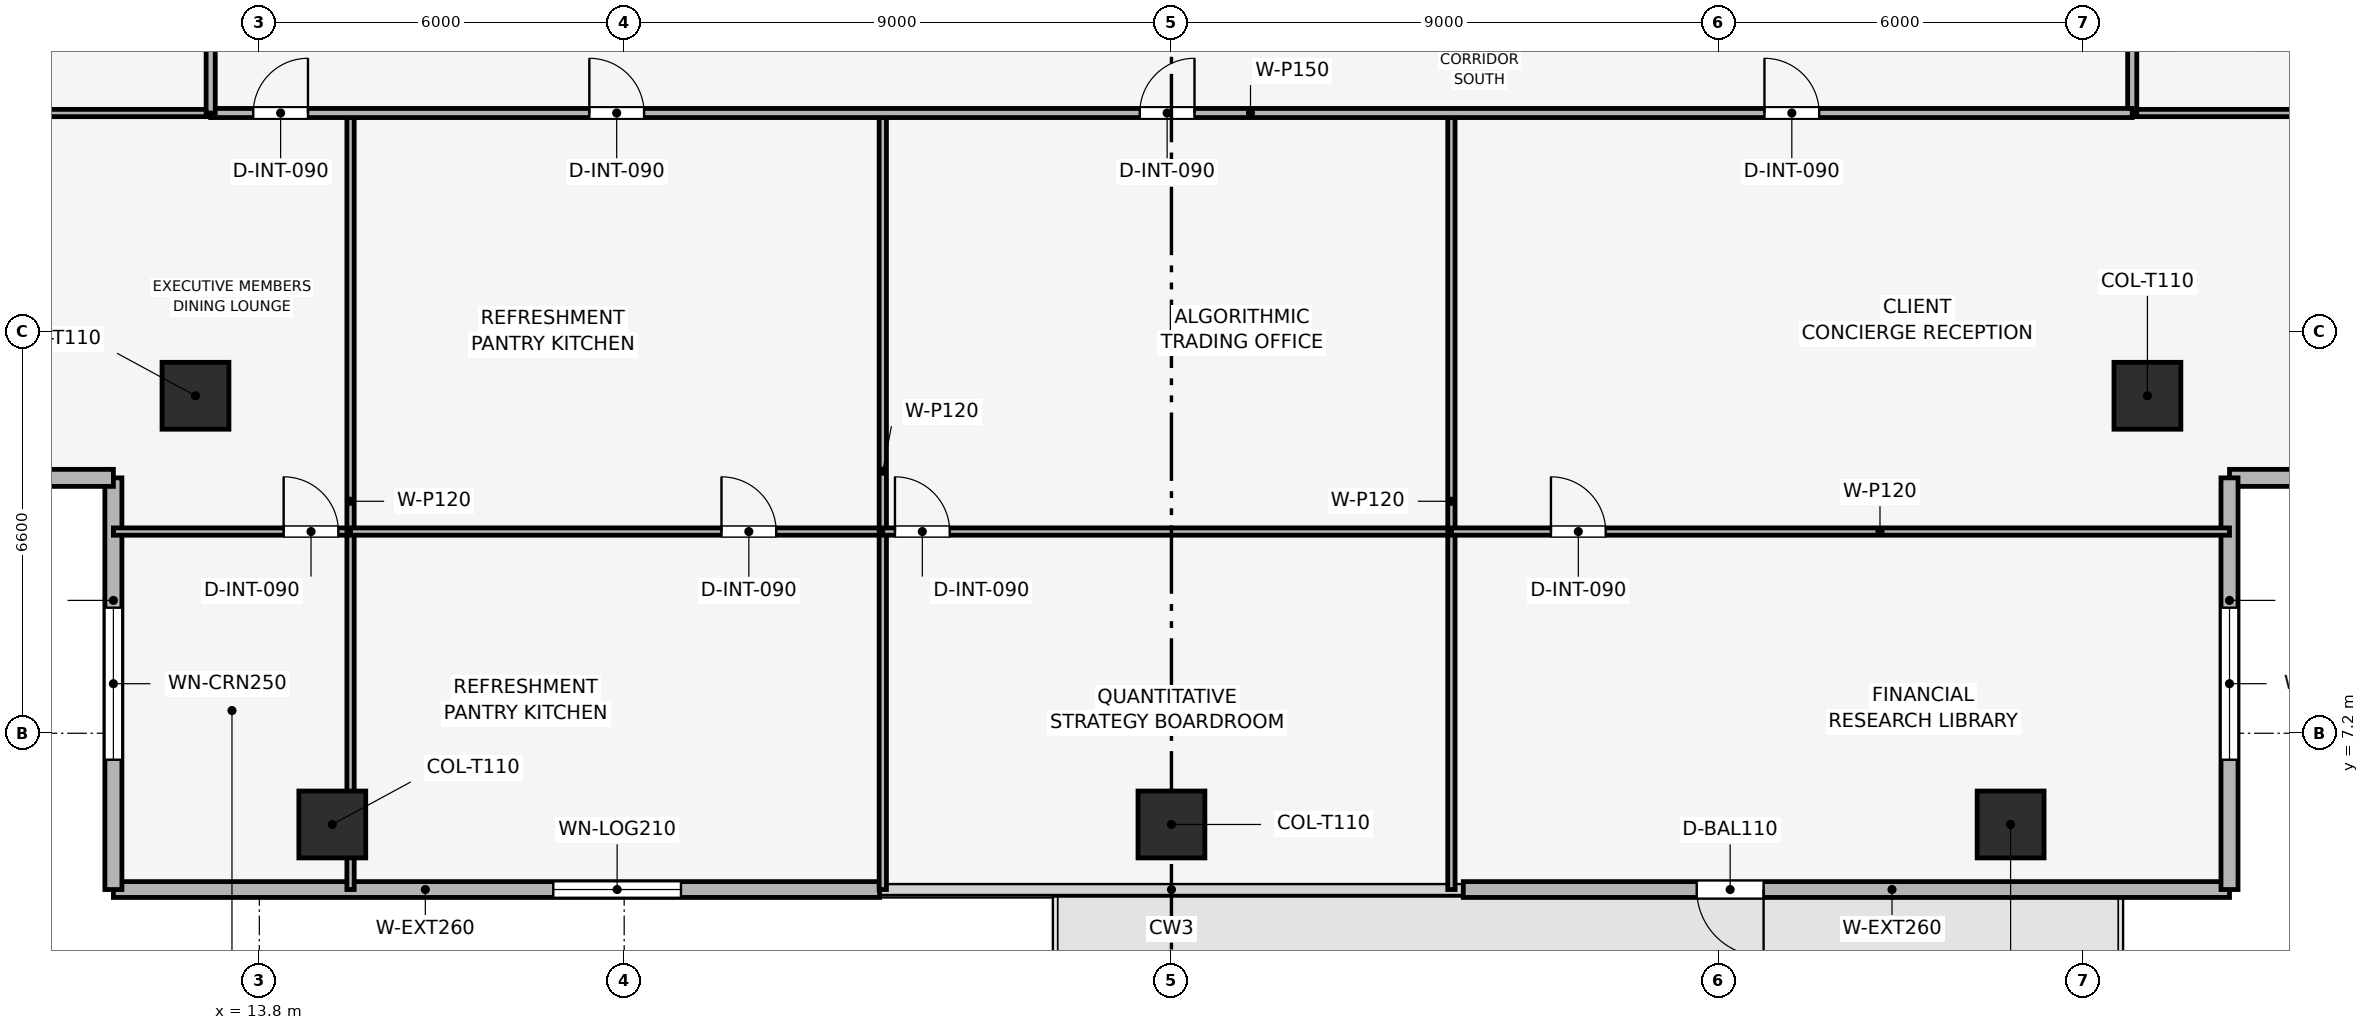
"""IFC4 building model, lengths in metres.
Left out: names, types, materials, properties, quantities, classifications, styles, units other than length and angle.
Written with IfcOpenShell. Run it as: python <this file> out.ifc"""

import sys

from ifc_helpers import new_model, si_unit, direction, frame, frame_2d, origin, origin_2d, place, context, subcontext, project, spatial, rectangle, extrude, element, fill, save


model = new_model("IFC4")
c1 = context("Model", 3, precision=1e-05, world=origin(), true_north=direction((0.0, 1.0)))
c2 = subcontext(c1, "Body", "Model", "MODEL_VIEW")
j1 = project(units=[si_unit("LENGTHUNIT", "METRE"), si_unit("PLANEANGLEUNIT", "RADIAN")], contexts=[c1])
p1 = place(None, origin())
s1 = spatial("IfcSite", under=j1, at=p1, CompositionType="ELEMENT")
p2 = place(p1, origin())
s2 = spatial("IfcBuilding", under=s1, at=p2, CompositionType="ELEMENT")
p3 = place(p2, frame((0.0, 0.0, 187.05)))
s3 = spatial("IfcBuildingStorey", under=s2, at=p3, CompositionType="ELEMENT", Elevation=187.05)
for number, where, z_axis, x_axis in (
    (1, (15.0, 5.7, 0.003), (0.0, 0.0, 1.0), (1.0, 0.0, 0.0)),
    (2, (28.8, 5.7, 0.003), (0.0, 0.0, 1.0), (1.0, 0.0, 0.0)),
    (3, (42.6, 5.7, 0.003), (0.0, 0.0, 1.0), (1.0, 0.0, 0.0)),
    (4, (12.75, 12.75, 0.003), (0.0, 0.0, 1.0), (1.0, 0.0, 0.0)),
    (5, (44.85, 12.75, 0.003), (0.0, 0.0, 1.0), (1.0, 0.0, 0.0)),
):
    element("IfcColumn", number, at=place(p3, frame(where, z_axis=z_axis, x_axis=x_axis)), inside=s3, PredefinedType="COLUMN", context=c2, shape_type="SweptSolid", body=[
        extrude(rectangle(XDim=1.1, YDim=1.1, at=origin_2d()), origin(), (0.0, 0.0, 1.0), 3.489),
    ])
p4 = place(p3, frame((46.2, 4.63, 0.0), z_axis=(0.0, 0.0, 1.0), x_axis=(-1.0, 0.0, 0.0)))
e6 = element("IfcWall", 6, at=p4, inside=s3, PredefinedType="SOLIDWALL", context=c2, shape_type="SweptSolid", body=[
    extrude(rectangle(XDim=12.6, YDim=0.26, at=frame_2d((6.3, 0.0))), origin(), (0.0, 0.0, 1.0), 3.495),
])
p5 = place(p4, frame((7.662, 0.0, 0.0)))
e7 = element("IfcOpeningElement", 7, at=p5, cuts=e6, PredefinedType="OPENING", context=c2, shape_type="SweptSolid", body=[
    extrude(rectangle(XDim=1.1, YDim=2.2, at=frame_2d((0.55, 1.1))), frame((0.0, 0.14, 0.0), z_axis=(0.0, -1.0, 0.0), x_axis=(1.0, 0.0, 0.0)), (0.0, 0.0, 1.0), 0.28),
])
p6 = place(p3, frame((24.0, 4.63, 0.0), z_axis=(0.0, 0.0, 1.0), x_axis=(-1.0, 0.0, 0.0)))
e8 = element("IfcWall", 8, at=p6, inside=s3, PredefinedType="SOLIDWALL", context=c2, shape_type="SweptSolid", body=[
    extrude(rectangle(XDim=12.6, YDim=0.26, at=frame_2d((6.3, 0.0))), origin(), (0.0, 0.0, 1.0), 3.495),
])
p7 = place(p6, frame((3.266, 0.0, 0.9)))
e9 = element("IfcOpeningElement", 9, at=p7, cuts=e8, PredefinedType="OPENING", context=c2, shape_type="SweptSolid", body=[
    extrude(rectangle(XDim=2.1, YDim=2.1, at=frame_2d((1.05, 1.05))), frame((0.0, 0.14, 0.0), z_axis=(0.0, -1.0, 0.0), x_axis=(1.0, 0.0, 0.0)), (0.0, 0.0, 1.0), 0.28),
])
p8 = place(p3, frame((11.4, 4.63, 0.0), z_axis=(0.0, 0.0, 1.0), x_axis=(0.0, 1.0, 0.0)))
e10 = element("IfcWall", 10, at=p8, inside=s3, PredefinedType="SOLIDWALL", context=c2, shape_type="SweptSolid", body=[
    extrude(rectangle(XDim=6.77, YDim=0.28, at=frame_2d((3.385, 0.0))), origin(), (0.0, 0.0, 1.0), 3.495),
])
p9 = place(p8, frame((2.135, 0.0, 0.9)))
e11 = element("IfcOpeningElement", 11, at=p9, cuts=e10, PredefinedType="OPENING", context=c2, shape_type="SweptSolid", body=[
    extrude(rectangle(XDim=2.5, YDim=1.9, at=frame_2d((1.25, 0.95))), frame((0.0, 0.15, 0.0), z_axis=(0.0, -1.0, 0.0), x_axis=(1.0, 0.0, 0.0)), (0.0, 0.0, 1.0), 0.3),
])
p10 = place(p3, frame((11.4, 11.4, 0.0), z_axis=(0.0, 0.0, 1.0), x_axis=(-1.0, 0.0, 0.0)))
e12 = element("IfcWall", 12, at=p10, inside=s3, PredefinedType="SOLIDWALL", context=c2, shape_type="SweptSolid", body=[
    extrude(rectangle(XDim=6.77, YDim=0.28, at=frame_2d((3.385, 0.0))), origin(), (0.0, 0.0, 1.0), 3.495),
])
p11 = place(p10, frame((2.135, 0.0, 0.9)))
e13 = element("IfcOpeningElement", 13, at=p11, cuts=e12, PredefinedType="OPENING", context=c2, shape_type="SweptSolid", body=[
    extrude(rectangle(XDim=2.5, YDim=1.9, at=frame_2d((1.25, 0.95))), frame((0.0, 0.15, 0.0), z_axis=(0.0, -1.0, 0.0), x_axis=(1.0, 0.0, 0.0)), (0.0, 0.0, 1.0), 0.3),
])
p12 = place(p3, frame((52.97, 11.4, 0.0), z_axis=(0.0, 0.0, 1.0), x_axis=(-1.0, 0.0, 0.0)))
e14 = element("IfcWall", 14, at=p12, inside=s3, PredefinedType="SOLIDWALL", context=c2, shape_type="SweptSolid", body=[
    extrude(rectangle(XDim=6.77, YDim=0.28, at=frame_2d((3.385, 0.0))), origin(), (0.0, 0.0, 1.0), 3.495),
])
p13 = place(p12, frame((2.135, 0.0, 0.9)))
e15 = element("IfcOpeningElement", 15, at=p13, cuts=e14, PredefinedType="OPENING", context=c2, shape_type="SweptSolid", body=[
    extrude(rectangle(XDim=2.5, YDim=1.9, at=frame_2d((1.25, 0.95))), frame((0.0, 0.15, 0.0), z_axis=(0.0, -1.0, 0.0), x_axis=(1.0, 0.0, 0.0)), (0.0, 0.0, 1.0), 0.3),
])
p14 = place(p3, frame((46.2, 11.4, 0.0), z_axis=(0.0, 0.0, 1.0), x_axis=(0.0, -1.0, 0.0)))
e16 = element("IfcWall", 16, at=p14, inside=s3, PredefinedType="SOLIDWALL", context=c2, shape_type="SweptSolid", body=[
    extrude(rectangle(XDim=6.77, YDim=0.28, at=frame_2d((3.385, 0.0))), origin(), (0.0, 0.0, 1.0), 3.495),
])
p15 = place(p14, frame((2.135, 0.0, 0.9)))
e17 = element("IfcOpeningElement", 17, at=p15, cuts=e16, PredefinedType="OPENING", context=c2, shape_type="SweptSolid", body=[
    extrude(rectangle(XDim=2.5, YDim=1.9, at=frame_2d((1.25, 0.95))), frame((0.0, 0.15, 0.0), z_axis=(0.0, -1.0, 0.0), x_axis=(1.0, 0.0, 0.0)), (0.0, 0.0, 1.0), 0.3),
])
p16 = place(p3, frame((11.4, 10.517, 0.0), z_axis=(0.0, 0.0, 1.0), x_axis=(1.0, 0.0, 0.0)))
e18 = element("IfcWall", 18, at=p16, inside=s3, PredefinedType="PARTITIONING", context=c2, shape_type="SweptSolid", body=[
    extrude(rectangle(XDim=3.9, YDim=0.12, at=frame_2d((1.95, 0.0))), origin(), (0.0, 0.0, 1.0), 2.98),
])
p17 = place(p16, frame((2.8, 0.0, 0.0)))
e19 = element("IfcOpeningElement", 19, at=p17, cuts=e18, PredefinedType="OPENING", context=c2, shape_type="SweptSolid", body=[
    extrude(rectangle(XDim=0.9, YDim=2.1, at=frame_2d((0.45, 1.05))), frame((0.0, 0.07, 0.0), z_axis=(0.0, -1.0, 0.0), x_axis=(1.0, 0.0, 0.0)), (0.0, 0.0, 1.0), 0.14),
])
p18 = place(p3, frame((15.3, 4.63, 0.0), z_axis=(0.0, 0.0, 1.0), x_axis=(0.0, 1.0, 0.0)))
e20 = element("IfcWall", 20, at=p18, inside=s3, PredefinedType="PARTITIONING", context=c2, shape_type="SweptSolid", body=[
    extrude(rectangle(XDim=12.77, YDim=0.12, at=frame_2d((6.385, 0.0))), origin(), (0.0, 0.0, 1.0), 2.98),
])
p19 = place(p3, frame((15.3, 10.517, 0.0), z_axis=(0.0, 0.0, 1.0), x_axis=(1.0, 0.0, 0.0)))
e21 = element("IfcWall", 21, at=p19, inside=s3, PredefinedType="PARTITIONING", context=c2, shape_type="SweptSolid", body=[
    extrude(rectangle(XDim=8.753, YDim=0.12, at=frame_2d((4.376, 0.0))), origin(), (0.0, 0.0, 1.0), 3.03),
])
p20 = place(p19, frame((6.1, 0.0, 0.0)))
e22 = element("IfcOpeningElement", 22, at=p20, cuts=e21, PredefinedType="OPENING", context=c2, shape_type="SweptSolid", body=[
    extrude(rectangle(XDim=0.9, YDim=2.1, at=frame_2d((0.45, 1.05))), frame((0.0, 0.07, 0.0), z_axis=(0.0, -1.0, 0.0), x_axis=(1.0, 0.0, 0.0)), (0.0, 0.0, 1.0), 0.14),
])
p21 = place(p3, frame((24.053, 4.63, 0.0), z_axis=(0.0, 0.0, 1.0), x_axis=(0.0, 1.0, 0.0)))
e23 = element("IfcWall", 23, at=p21, inside=s3, PredefinedType="PARTITIONING", context=c2, shape_type="SweptSolid", body=[
    extrude(rectangle(XDim=12.77, YDim=0.12, at=frame_2d((6.385, 0.0))), origin(), (0.0, 0.0, 1.0), 2.98),
])
p22 = place(p3, frame((24.053, 10.517, 0.0), z_axis=(0.0, 0.0, 1.0), x_axis=(1.0, 0.0, 0.0)))
e24 = element("IfcWall", 24, at=p22, inside=s3, PredefinedType="PARTITIONING", context=c2, shape_type="SweptSolid", body=[
    extrude(rectangle(XDim=9.351, YDim=0.12, at=frame_2d((4.676, 0.0))), origin(), (0.0, 0.0, 1.0), 3.03),
])
p23 = place(p22, frame((0.2, 0.0, 0.0)))
e25 = element("IfcOpeningElement", 25, at=p23, cuts=e24, PredefinedType="OPENING", context=c2, shape_type="SweptSolid", body=[
    extrude(rectangle(XDim=0.9, YDim=2.1, at=frame_2d((0.45, 1.05))), frame((0.0, 0.07, 0.0), z_axis=(0.0, -1.0, 0.0), x_axis=(1.0, 0.0, 0.0)), (0.0, 0.0, 1.0), 0.14),
])
p24 = place(p3, frame((33.404, 4.63, 0.0), z_axis=(0.0, 0.0, 1.0), x_axis=(0.0, 1.0, 0.0)))
e26 = element("IfcWall", 26, at=p24, inside=s3, PredefinedType="PARTITIONING", context=c2, shape_type="SweptSolid", body=[
    extrude(rectangle(XDim=12.77, YDim=0.12, at=frame_2d((6.385, 0.0))), origin(), (0.0, 0.0, 1.0), 2.98),
])
p25 = place(p3, frame((33.404, 10.517, 0.0), z_axis=(0.0, 0.0, 1.0), x_axis=(1.0, 0.0, 0.0)))
e27 = element("IfcWall", 27, at=p25, inside=s3, PredefinedType="PARTITIONING", context=c2, shape_type="SweptSolid", body=[
    extrude(rectangle(XDim=12.796, YDim=0.12, at=frame_2d((6.398, 0.0))), origin(), (0.0, 0.0, 1.0), 2.98),
])
p26 = place(p25, frame((1.637, 0.0, 0.0)))
e28 = element("IfcOpeningElement", 28, at=p26, cuts=e27, PredefinedType="OPENING", context=c2, shape_type="SweptSolid", body=[
    extrude(rectangle(XDim=0.9, YDim=2.1, at=frame_2d((0.45, 1.05))), frame((0.0, 0.07, 0.0), z_axis=(0.0, -1.0, 0.0), x_axis=(1.0, 0.0, 0.0)), (0.0, 0.0, 1.0), 0.14),
])
p27 = place(p3, frame((4.63, 17.4, 0.0), z_axis=(0.0, 0.0, 1.0), x_axis=(1.0, 0.0, 0.0)))
e29 = element("IfcWall", 29, at=p27, inside=s3, PredefinedType="PARTITIONING", context=c2, shape_type="SweptSolid", body=[
    extrude(rectangle(XDim=8.37, YDim=0.12, at=frame_2d((4.185, 0.0))), origin(), (0.0, 0.0, 1.0), 2.98),
])
p28 = place(p3, frame((44.6, 17.4, 0.0), z_axis=(0.0, 0.0, 1.0), x_axis=(1.0, 0.0, 0.0)))
e30 = element("IfcWall", 30, at=p28, inside=s3, PredefinedType="PARTITIONING", context=c2, shape_type="SweptSolid", body=[
    extrude(rectangle(XDim=8.37, YDim=0.12, at=frame_2d((4.185, 0.0))), origin(), (0.0, 0.0, 1.0), 2.98),
])
p29 = place(p3, frame((44.6, 17.4, 0.0), z_axis=(0.0, 0.0, 1.0), x_axis=(0.0, 1.0, 0.0)))
e31 = element("IfcWall", 31, at=p29, inside=s3, PredefinedType="PARTITIONING", context=c2, shape_type="SweptSolid", body=[
    extrude(rectangle(XDim=2.4, YDim=0.15, at=frame_2d((1.2, 0.0))), origin(), (0.0, 0.0, 1.0), 3.495),
])
p30 = place(p3, frame((13.0, 17.4, 0.0), z_axis=(0.0, 0.0, 1.0), x_axis=(1.0, 0.0, 0.0)))
e32 = element("IfcWall", 32, at=p30, inside=s3, PredefinedType="PARTITIONING", context=c2, shape_type="SweptSolid", body=[
    extrude(rectangle(XDim=31.6, YDim=0.15, at=frame_2d((15.8, 0.0))), origin(), (0.0, 0.0, 1.0), 3.03),
])
p31 = place(p30, frame((0.7, 0.0, 0.0)))
e33 = element("IfcOpeningElement", 33, at=p31, cuts=e32, PredefinedType="OPENING", context=c2, shape_type="SweptSolid", body=[
    extrude(rectangle(XDim=0.9, YDim=2.1, at=frame_2d((0.45, 1.05))), frame((0.0, 0.085, 0.0), z_axis=(0.0, -1.0, 0.0), x_axis=(1.0, 0.0, 0.0)), (0.0, 0.0, 1.0), 0.17),
])
p32 = place(p30, frame((6.227, 0.0, 0.0)))
e34 = element("IfcOpeningElement", 34, at=p32, cuts=e32, PredefinedType="OPENING", context=c2, shape_type="SweptSolid", body=[
    extrude(rectangle(XDim=0.9, YDim=2.1, at=frame_2d((0.45, 1.05))), frame((0.0, 0.085, 0.0), z_axis=(0.0, -1.0, 0.0), x_axis=(1.0, 0.0, 0.0)), (0.0, 0.0, 1.0), 0.17),
])
p33 = place(p30, frame((15.279, 0.0, 0.0)))
e35 = element("IfcOpeningElement", 35, at=p33, cuts=e32, PredefinedType="OPENING", context=c2, shape_type="SweptSolid", body=[
    extrude(rectangle(XDim=0.9, YDim=2.1, at=frame_2d((0.45, 1.05))), frame((0.0, 0.085, 0.0), z_axis=(0.0, -1.0, 0.0), x_axis=(1.0, 0.0, 0.0)), (0.0, 0.0, 1.0), 0.17),
])
p34 = place(p30, frame((25.552, 0.0, 0.0)))
e36 = element("IfcOpeningElement", 36, at=p34, cuts=e32, PredefinedType="OPENING", context=c2, shape_type="SweptSolid", body=[
    extrude(rectangle(XDim=0.9, YDim=2.1, at=frame_2d((0.45, 1.05))), frame((0.0, 0.085, 0.0), z_axis=(0.0, -1.0, 0.0), x_axis=(1.0, 0.0, 0.0)), (0.0, 0.0, 1.0), 0.17),
])
p35 = place(p3, frame((13.0, 17.4, 0.0), z_axis=(0.0, 0.0, 1.0), x_axis=(0.0, 1.0, 0.0)))
e37 = element("IfcWall", 37, at=p35, inside=s3, PredefinedType="PARTITIONING", context=c2, shape_type="SweptSolid", body=[
    extrude(rectangle(XDim=22.8, YDim=0.15, at=frame_2d((11.4, 0.0))), origin(), (0.0, 0.0, 1.0), 3.03),
])
p36 = place(p35, frame((10.95, 0.0, 0.0)))
e38 = element("IfcOpeningElement", 38, at=p36, cuts=e37, PredefinedType="OPENING", context=c2, shape_type="SweptSolid", body=[
    extrude(rectangle(XDim=0.9, YDim=2.1, at=frame_2d((0.45, 1.05))), frame((0.0, 0.085, 0.0), z_axis=(0.0, -1.0, 0.0), x_axis=(1.0, 0.0, 0.0)), (0.0, 0.0, 1.0), 0.17),
])
p37 = place(p5, origin())
e39 = element("IfcDoor", 39, at=p37, inside=s3, OperationType="SINGLE_SWING_LEFT", PredefinedType="DOOR", context=c2, shape_type="SweptSolid", body=[
    extrude(rectangle(XDim=1.1, YDim=2.2, at=frame_2d((0.55, 1.1))), frame((0.0, 0.025, 0.0), z_axis=(0.0, -1.0, 0.0), x_axis=(1.0, 0.0, 0.0)), (0.0, 0.0, 1.0), 0.05),
])
fill(e7, e39)
p38 = place(p7, origin())
e40 = element("IfcWindow", 40, at=p38, inside=s3, PartitioningType="SINGLE_PANEL", PredefinedType="WINDOW", context=c2, shape_type="SweptSolid", body=[
    extrude(rectangle(XDim=2.1, YDim=2.1, at=frame_2d((1.05, 1.05))), frame((0.0, 0.03, 0.0), z_axis=(0.0, -1.0, 0.0), x_axis=(1.0, 0.0, 0.0)), (0.0, 0.0, 1.0), 0.06),
])
fill(e9, e40)
p39 = place(p9, origin())
e41 = element("IfcWindow", 41, at=p39, inside=s3, PartitioningType="SINGLE_PANEL", PredefinedType="WINDOW", context=c2, shape_type="SweptSolid", body=[
    extrude(rectangle(XDim=2.5, YDim=1.9, at=frame_2d((1.25, 0.95))), frame((0.0, 0.03, 0.0), z_axis=(0.0, -1.0, 0.0), x_axis=(1.0, 0.0, 0.0)), (0.0, 0.0, 1.0), 0.06),
])
fill(e11, e41)
p40 = place(p15, origin())
e42 = element("IfcWindow", 42, at=p40, inside=s3, PartitioningType="SINGLE_PANEL", PredefinedType="WINDOW", context=c2, shape_type="SweptSolid", body=[
    extrude(rectangle(XDim=2.5, YDim=1.9, at=frame_2d((1.25, 0.95))), frame((0.0, 0.03, 0.0), z_axis=(0.0, -1.0, 0.0), x_axis=(1.0, 0.0, 0.0)), (0.0, 0.0, 1.0), 0.06),
])
fill(e17, e42)
p41 = place(p17, origin())
e43 = element("IfcDoor", 43, at=p41, inside=s3, OperationType="SINGLE_SWING_LEFT", PredefinedType="DOOR", context=c2, shape_type="SweptSolid", body=[
    extrude(rectangle(XDim=0.9, YDim=2.1, at=frame_2d((0.45, 1.05))), frame((0.0, 0.025, 0.0), z_axis=(0.0, -1.0, 0.0), x_axis=(1.0, 0.0, 0.0)), (0.0, 0.0, 1.0), 0.05),
])
fill(e19, e43)
p42 = place(p20, origin())
e44 = element("IfcDoor", 44, at=p42, inside=s3, OperationType="SINGLE_SWING_LEFT", PredefinedType="DOOR", context=c2, shape_type="SweptSolid", body=[
    extrude(rectangle(XDim=0.9, YDim=2.1, at=frame_2d((0.45, 1.05))), frame((0.0, 0.025, 0.0), z_axis=(0.0, -1.0, 0.0), x_axis=(1.0, 0.0, 0.0)), (0.0, 0.0, 1.0), 0.05),
])
fill(e22, e44)
p43 = place(p23, origin())
e45 = element("IfcDoor", 45, at=p43, inside=s3, OperationType="SINGLE_SWING_LEFT", PredefinedType="DOOR", context=c2, shape_type="SweptSolid", body=[
    extrude(rectangle(XDim=0.9, YDim=2.1, at=frame_2d((0.45, 1.05))), frame((0.0, 0.025, 0.0), z_axis=(0.0, -1.0, 0.0), x_axis=(1.0, 0.0, 0.0)), (0.0, 0.0, 1.0), 0.05),
])
fill(e25, e45)
p44 = place(p26, origin())
e46 = element("IfcDoor", 46, at=p44, inside=s3, OperationType="SINGLE_SWING_LEFT", PredefinedType="DOOR", context=c2, shape_type="SweptSolid", body=[
    extrude(rectangle(XDim=0.9, YDim=2.1, at=frame_2d((0.45, 1.05))), frame((0.0, 0.025, 0.0), z_axis=(0.0, -1.0, 0.0), x_axis=(1.0, 0.0, 0.0)), (0.0, 0.0, 1.0), 0.05),
])
fill(e28, e46)
p45 = place(p31, origin())
e47 = element("IfcDoor", 47, at=p45, inside=s3, OperationType="SINGLE_SWING_RIGHT", PredefinedType="DOOR", context=c2, shape_type="SweptSolid", body=[
    extrude(rectangle(XDim=0.9, YDim=2.1, at=frame_2d((0.45, 1.05))), frame((0.0, 0.025, 0.0), z_axis=(0.0, -1.0, 0.0), x_axis=(1.0, 0.0, 0.0)), (0.0, 0.0, 1.0), 0.05),
])
fill(e33, e47)
p46 = place(p32, origin())
e48 = element("IfcDoor", 48, at=p46, inside=s3, OperationType="SINGLE_SWING_LEFT", PredefinedType="DOOR", context=c2, shape_type="SweptSolid", body=[
    extrude(rectangle(XDim=0.9, YDim=2.1, at=frame_2d((0.45, 1.05))), frame((0.0, 0.025, 0.0), z_axis=(0.0, -1.0, 0.0), x_axis=(1.0, 0.0, 0.0)), (0.0, 0.0, 1.0), 0.05),
])
fill(e34, e48)
p47 = place(p33, origin())
e49 = element("IfcDoor", 49, at=p47, inside=s3, OperationType="SINGLE_SWING_RIGHT", PredefinedType="DOOR", context=c2, shape_type="SweptSolid", body=[
    extrude(rectangle(XDim=0.9, YDim=2.1, at=frame_2d((0.45, 1.05))), frame((0.0, 0.025, 0.0), z_axis=(0.0, -1.0, 0.0), x_axis=(1.0, 0.0, 0.0)), (0.0, 0.0, 1.0), 0.05),
])
fill(e35, e49)
p48 = place(p34, origin())
e50 = element("IfcDoor", 50, at=p48, inside=s3, OperationType="SINGLE_SWING_LEFT", PredefinedType="DOOR", context=c2, shape_type="SweptSolid", body=[
    extrude(rectangle(XDim=0.9, YDim=2.1, at=frame_2d((0.45, 1.05))), frame((0.0, 0.025, 0.0), z_axis=(0.0, -1.0, 0.0), x_axis=(1.0, 0.0, 0.0)), (0.0, 0.0, 1.0), 0.05),
])
fill(e36, e50)
save(model, sys.argv[1])
